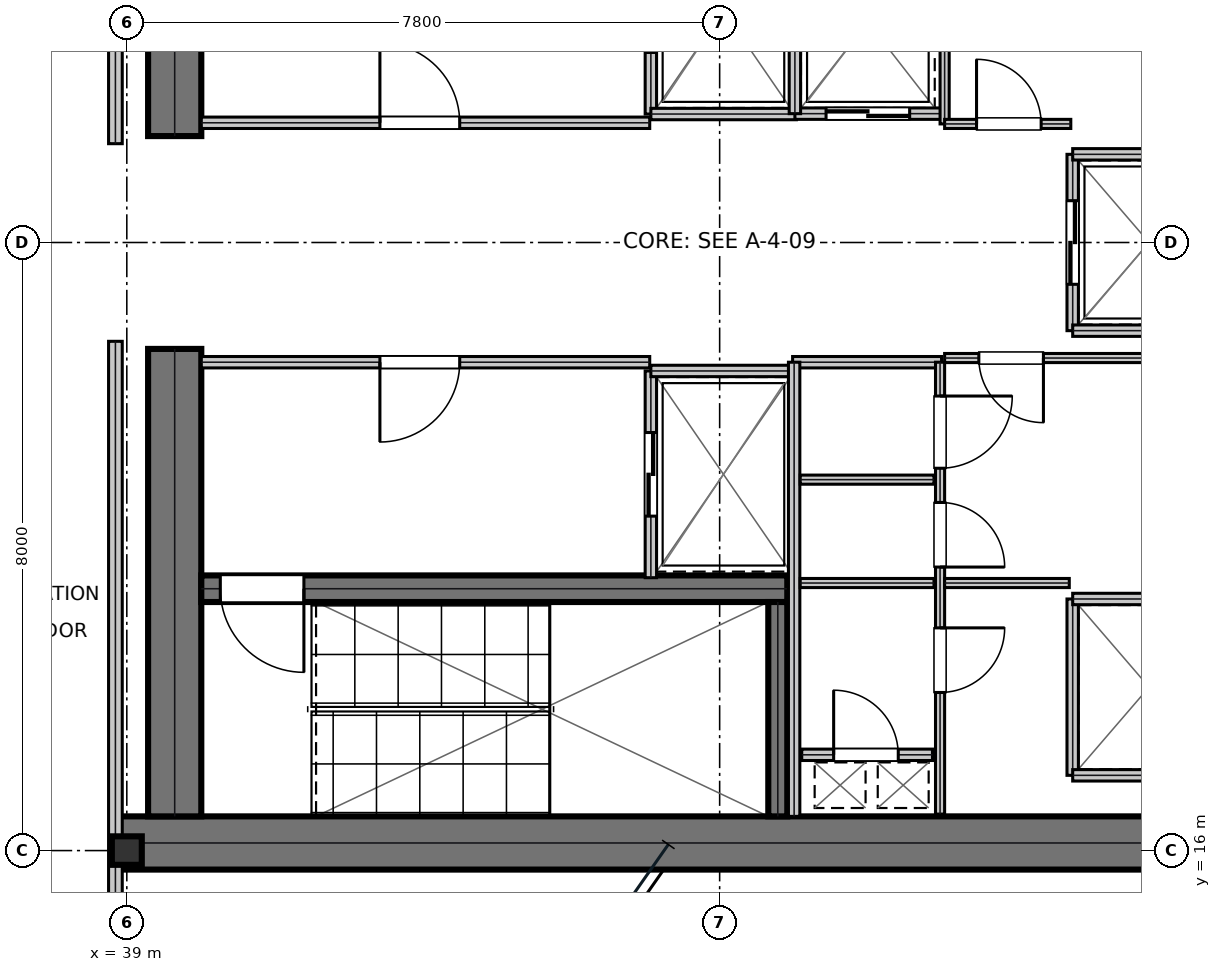
"""IFC4 building model, lengths in metres.
Left out: names, types, materials, properties, quantities, classifications, styles, units other than length and angle.
Written with IfcOpenShell. Run it as: python <this file> out.ifc"""

import sys

from ifc_helpers import new_model, si_unit, direction, frame, frame_2d, origin, origin_2d, place, context, subcontext, project, spatial, rectangle, i_section, extrude, element, fill, save


model = new_model("IFC4")
c1 = context("Model", 3, precision=1e-05, world=origin(), true_north=direction((0.0, 1.0)))
c2 = subcontext(c1, "Body", "Model", "MODEL_VIEW")
j1 = project(units=[si_unit("LENGTHUNIT", "METRE"), si_unit("PLANEANGLEUNIT", "RADIAN")], contexts=[c1])
p1 = place(None, origin())
s1 = spatial("IfcSite", under=j1, at=p1, CompositionType="ELEMENT")
p2 = place(p1, origin())
s2 = spatial("IfcBuilding", under=s1, at=p2, CompositionType="ELEMENT")
p3 = place(p2, frame((0.0, 0.0, 220.2)))
s3 = spatial("IfcBuildingStorey", under=s2, at=p3, CompositionType="ELEMENT", Elevation=220.2)
p4 = place(p3, frame((38.8, 16.1, 0.0), z_axis=(0.0, 0.0, 1.0), x_axis=(1.0, 0.0, 0.0)))
e1 = element("IfcWall", 1, at=p4, inside=s3, PredefinedType="SHEAR", context=c2, shape_type="SweptSolid", body=[
    extrude(rectangle(XDim=16.0, YDim=0.7, at=frame_2d((8.0, 0.0))), origin(), (0.0, 0.0, 1.0), 3.79),
])
for number, where, z_axis, x_axis in (
    (2, (39.63, 16.45, 0.0), (0.0, 0.0, 1.0), (0.0, 1.0, 0.0)),
    (3, (39.63, 25.4, 0.0), (0.0, 0.0, 1.0), (0.0, 1.0, 0.0)),
):
    element("IfcWall", number, at=place(p3, frame(where, z_axis=z_axis, x_axis=x_axis)), inside=s3, PredefinedType="SHEAR", context=c2, shape_type="SweptSolid", body=[
        extrude(rectangle(XDim=6.15, YDim=0.7, at=frame_2d((3.075, 0.0))), origin(), (0.0, 0.0, 1.0), 3.79),
    ])
p5 = place(p3, frame((39.98, 19.445, 0.0), z_axis=(0.0, 0.0, 1.0), x_axis=(1.0, 0.0, 0.0)))
e4 = element("IfcWall", 4, at=p5, inside=s3, PredefinedType="SHEAR", context=c2, shape_type="SweptSolid", body=[
    extrude(rectangle(XDim=7.71, YDim=0.35, at=frame_2d((3.855, 0.0))), origin(), (0.0, 0.0, 1.0), 3.79),
])
p6 = place(p5, frame((0.25, 0.0, 0.0)))
e5 = element("IfcOpeningElement", 5, at=p6, cuts=e4, PredefinedType="OPENING", context=c2, shape_type="SweptSolid", body=[
    extrude(rectangle(XDim=1.1, YDim=2.15, at=frame_2d((0.55, 1.075))), frame((0.0, 0.185, 0.0), z_axis=(0.0, -1.0, 0.0), x_axis=(1.0, 0.0, 0.0)), (0.0, 0.0, 1.0), 0.37),
])
p7 = place(p3, frame((47.565, 16.45, 0.0), z_axis=(0.0, 0.0, 1.0), x_axis=(0.0, 1.0, 0.0)))
e6 = element("IfcWall", 6, at=p7, inside=s3, PredefinedType="SHEAR", context=c2, shape_type="SweptSolid", body=[
    extrude(rectangle(XDim=2.82, YDim=0.25, at=frame_2d((1.41, 0.0))), origin(), (0.0, 0.0, 1.0), 3.79),
])
p8 = place(p3, frame((39.0, 16.0, 0.0), z_axis=(0.0, 0.0, 1.0), x_axis=(1.0, 0.0, 0.0)))
e7 = element("IfcColumn", 7, at=p8, inside=s3, PredefinedType="COLUMN", context=c2, shape_type="SweptSolid", body=[
    extrude(i_section(OverallWidth=0.394, OverallDepth=0.375, WebThickness=0.017, FlangeThickness=0.028, at=origin_2d()), origin(), (0.0, 0.0, 1.0), 4.044),
])
p9 = place(p3, frame((39.98, 25.575, 0.0), z_axis=(0.0, 0.0, 1.0), x_axis=(1.0, 0.0, 0.0)))
e8 = element("IfcWall", 8, at=p9, inside=s3, PredefinedType="PARTITIONING", context=c2, shape_type="SweptSolid", body=[
    extrude(rectangle(XDim=5.9, YDim=0.15, at=frame_2d((2.95, 0.0))), origin(), (0.0, 0.0, 1.0), 3.79),
])
p10 = place(p9, frame((2.35, 0.0, 0.0)))
e9 = element("IfcOpeningElement", 9, at=p10, cuts=e8, PredefinedType="OPENING", context=c2, shape_type="SweptSolid", body=[
    extrude(rectangle(XDim=1.05, YDim=2.15, at=frame_2d((0.525, 1.075))), frame((0.0, 0.085, 0.0), z_axis=(0.0, -1.0, 0.0), x_axis=(1.0, 0.0, 0.0)), (0.0, 0.0, 1.0), 0.17),
])
p11 = place(p3, frame((39.98, 22.425, 0.0), z_axis=(0.0, 0.0, 1.0), x_axis=(1.0, 0.0, 0.0)))
e10 = element("IfcWall", 10, at=p11, inside=s3, PredefinedType="PARTITIONING", context=c2, shape_type="SweptSolid", body=[
    extrude(rectangle(XDim=5.9, YDim=0.15, at=frame_2d((2.95, 0.0))), origin(), (0.0, 0.0, 1.0), 3.79),
])
p12 = place(p11, frame((2.35, 0.0, 0.0)))
e11 = element("IfcOpeningElement", 11, at=p12, cuts=e10, PredefinedType="OPENING", context=c2, shape_type="SweptSolid", body=[
    extrude(rectangle(XDim=1.05, YDim=2.15, at=frame_2d((0.525, 1.075))), frame((0.0, 0.085, 0.0), z_axis=(0.0, -1.0, 0.0), x_axis=(1.0, 0.0, 0.0)), (0.0, 0.0, 1.0), 0.17),
])
p13 = place(p3, frame((45.895, 25.69, 0.0), z_axis=(0.0, 0.0, 1.0), x_axis=(0.0, 1.0, 0.0)))
e12 = element("IfcWall", 12, at=p13, inside=s3, PredefinedType="PARTITIONING", context=c2, shape_type="SweptSolid", body=[
    extrude(rectangle(XDim=2.72, YDim=0.15, at=frame_2d((1.36, 0.0))), origin(), (0.0, 0.0, 1.0), 3.79),
])
p14 = place(p13, frame((0.81, 0.0, 0.0)))
e13 = element("IfcOpeningElement", 13, at=p14, cuts=e12, PredefinedType="OPENING", context=c2, shape_type="SweptSolid", body=[
    extrude(rectangle(XDim=1.1, YDim=2.15, at=frame_2d((0.55, 1.075))), frame((0.0, 0.085, 0.0), z_axis=(0.0, -1.0, 0.0), x_axis=(1.0, 0.0, 0.0)), (0.0, 0.0, 1.0), 0.17),
])
p15 = place(p3, frame((45.895, 25.69, 0.0), z_axis=(0.0, 0.0, 1.0), x_axis=(1.0, 0.0, 0.0)))
e14 = element("IfcWall", 14, at=p15, inside=s3, PredefinedType="PARTITIONING", context=c2, shape_type="SweptSolid", body=[
    extrude(rectangle(XDim=1.915, YDim=0.15, at=frame_2d((0.958, 0.0))), origin(), (0.0, 0.0, 1.0), 3.79),
])
p16 = place(p3, frame((45.895, 19.59, 0.0), z_axis=(0.0, 0.0, 1.0), x_axis=(0.0, 1.0, 0.0)))
e15 = element("IfcWall", 15, at=p16, inside=s3, PredefinedType="PARTITIONING", context=c2, shape_type="SweptSolid", body=[
    extrude(rectangle(XDim=2.72, YDim=0.15, at=frame_2d((1.36, 0.0))), origin(), (0.0, 0.0, 1.0), 3.79),
])
p17 = place(p16, frame((0.81, 0.0, 0.0)))
e16 = element("IfcOpeningElement", 16, at=p17, cuts=e15, PredefinedType="OPENING", context=c2, shape_type="SweptSolid", body=[
    extrude(rectangle(XDim=1.1, YDim=2.15, at=frame_2d((0.55, 1.075))), frame((0.0, 0.085, 0.0), z_axis=(0.0, -1.0, 0.0), x_axis=(1.0, 0.0, 0.0)), (0.0, 0.0, 1.0), 0.17),
])
p18 = place(p3, frame((45.895, 22.31, 0.0), z_axis=(0.0, 0.0, 1.0), x_axis=(1.0, 0.0, 0.0)))
e17 = element("IfcWall", 17, at=p18, inside=s3, PredefinedType="PARTITIONING", context=c2, shape_type="SweptSolid", body=[
    extrude(rectangle(XDim=1.915, YDim=0.15, at=frame_2d((0.958, 0.0))), origin(), (0.0, 0.0, 1.0), 3.79),
])
p19 = place(p3, frame((47.79, 25.695, 0.0), z_axis=(0.0, 0.0, 1.0), x_axis=(1.0, 0.0, 0.0)))
e18 = element("IfcWall", 18, at=p19, inside=s3, PredefinedType="PARTITIONING", context=c2, shape_type="SweptSolid", body=[
    extrude(rectangle(XDim=1.92, YDim=0.15, at=frame_2d((0.96, 0.0))), origin(), (0.0, 0.0, 1.0), 3.79),
])
p20 = place(p19, frame((0.41, 0.0, 0.0)))
e19 = element("IfcOpeningElement", 19, at=p20, cuts=e18, PredefinedType="OPENING", context=c2, shape_type="SweptSolid", body=[
    extrude(rectangle(XDim=1.1, YDim=2.15, at=frame_2d((0.55, 1.075))), frame((0.0, 0.085, 0.0), z_axis=(0.0, -1.0, 0.0), x_axis=(1.0, 0.0, 0.0)), (0.0, 0.0, 1.0), 0.17),
])
p21 = place(p3, frame((47.79, 25.695, 0.0), z_axis=(0.0, 0.0, 1.0), x_axis=(0.0, 1.0, 0.0)))
e20 = element("IfcWall", 20, at=p21, inside=s3, PredefinedType="PARTITIONING", context=c2, shape_type="SweptSolid", body=[
    extrude(rectangle(XDim=2.415, YDim=0.15, at=frame_2d((1.208, 0.0))), origin(), (0.0, 0.0, 1.0), 3.79),
])
p22 = place(p3, frame((51.445, 22.84, 0.0), z_axis=(0.0, 0.0, 1.0), x_axis=(0.0, 1.0, 0.0)))
e21 = element("IfcWall", 21, at=p22, inside=s3, PredefinedType="PARTITIONING", context=c2, shape_type="SweptSolid", body=[
    extrude(rectangle(XDim=2.32, YDim=0.15, at=frame_2d((1.16, 0.0))), origin(), (0.0, 0.0, 1.0), 3.79),
])
p23 = place(p22, frame((0.61, 0.0, 0.0)))
e22 = element("IfcOpeningElement", 22, at=p23, cuts=e21, PredefinedType="OPENING", context=c2, shape_type="SweptSolid", body=[
    extrude(rectangle(XDim=1.1, YDim=2.15, at=frame_2d((0.55, 1.075))), frame((0.0, 0.085, 0.0), z_axis=(0.0, -1.0, 0.0), x_axis=(1.0, 0.0, 0.0)), (0.0, 0.0, 1.0), 0.17),
])
for number, where, z_axis, x_axis in (
    (23, (51.445, 22.84, 0.0), (0.0, 0.0, 1.0), (1.0, 0.0, 0.0)),
    (24, (51.445, 25.16, 0.0), (0.0, 0.0, 1.0), (1.0, 0.0, 0.0)),
):
    element("IfcWall", number, at=place(p3, frame(where, z_axis=z_axis, x_axis=x_axis)), inside=s3, PredefinedType="PARTITIONING", context=c2, shape_type="SweptSolid", body=[
        extrude(rectangle(XDim=2.015, YDim=0.15, at=frame_2d((1.007, 0.0))), origin(), (0.0, 0.0, 1.0), 3.79),
    ])
p24 = place(p3, frame((51.445, 16.99, 0.0), z_axis=(0.0, 0.0, 1.0), x_axis=(0.0, 1.0, 0.0)))
e25 = element("IfcWall", 25, at=p24, inside=s3, PredefinedType="PARTITIONING", context=c2, shape_type="SweptSolid", body=[
    extrude(rectangle(XDim=2.32, YDim=0.15, at=frame_2d((1.16, 0.0))), origin(), (0.0, 0.0, 1.0), 3.79),
])
for number, where, z_axis, x_axis in (
    (26, (51.445, 16.99, 0.0), (0.0, 0.0, 1.0), (1.0, 0.0, 0.0)),
    (27, (51.445, 19.31, 0.0), (0.0, 0.0, 1.0), (1.0, 0.0, 0.0)),
):
    element("IfcWall", number, at=place(p3, frame(where, z_axis=z_axis, x_axis=x_axis)), inside=s3, PredefinedType="PARTITIONING", context=c2, shape_type="SweptSolid", body=[
        extrude(rectangle(XDim=2.015, YDim=0.15, at=frame_2d((1.007, 0.0))), origin(), (0.0, 0.0, 1.0), 3.79),
    ])
p25 = place(p3, frame((47.88, 17.26, 0.0), z_axis=(0.0, 0.0, 1.0), x_axis=(1.0, 0.0, 0.0)))
e28 = element("IfcWall", 28, at=p25, inside=s3, PredefinedType="PARTITIONING", context=c2, shape_type="SweptSolid", body=[
    extrude(rectangle(XDim=1.72, YDim=0.15, at=frame_2d((0.86, 0.0))), origin(), (0.0, 0.0, 1.0), 3.79),
])
p26 = place(p25, frame((0.42, 0.0, 0.0)))
e29 = element("IfcOpeningElement", 29, at=p26, cuts=e28, PredefinedType="OPENING", context=c2, shape_type="SweptSolid", body=[
    extrude(rectangle(XDim=0.85, YDim=2.15, at=frame_2d((0.425, 1.075))), frame((0.0, 0.085, 0.0), z_axis=(0.0, -1.0, 0.0), x_axis=(1.0, 0.0, 0.0)), (0.0, 0.0, 1.0), 0.17),
])
p27 = place(p3, frame((47.76, 22.425, 0.0), z_axis=(0.0, 0.0, 1.0), x_axis=(1.0, 0.0, 0.0)))
e30 = element("IfcWall", 30, at=p27, inside=s3, PredefinedType="PARTITIONING", context=c2, shape_type="SweptSolid", body=[
    extrude(rectangle(XDim=1.96, YDim=0.15, at=frame_2d((0.98, 0.0))), origin(), (0.0, 0.0, 1.0), 3.79),
])
p28 = place(p3, frame((47.78, 16.45, 0.0), z_axis=(0.0, 0.0, 1.0), x_axis=(0.0, 1.0, 0.0)))
e31 = element("IfcWall", 31, at=p28, inside=s3, PredefinedType="PARTITIONING", context=c2, shape_type="SweptSolid", body=[
    extrude(rectangle(XDim=5.975, YDim=0.15, at=frame_2d((2.988, 0.0))), origin(), (0.0, 0.0, 1.0), 3.79),
])
for number, where, z_axis, x_axis in (
    (32, (47.86, 19.52, 0.0), (0.0, 0.0, 1.0), (1.0, 0.0, 0.0)),
    (33, (47.86, 20.88, 0.0), (0.0, 0.0, 1.0), (1.0, 0.0, 0.0)),
):
    element("IfcWall", number, at=place(p3, frame(where, z_axis=z_axis, x_axis=x_axis)), inside=s3, PredefinedType="PARTITIONING", context=c2, shape_type="SweptSolid", body=[
        extrude(rectangle(XDim=1.76, YDim=0.12, at=frame_2d((0.88, 0.0))), origin(), (0.0, 0.0, 1.0), 3.79),
    ])
p29 = place(p3, frame((49.7, 16.48, 0.0), z_axis=(0.0, 0.0, 1.0), x_axis=(0.0, 1.0, 0.0)))
e34 = element("IfcWall", 34, at=p29, inside=s3, PredefinedType="PARTITIONING", context=c2, shape_type="SweptSolid", body=[
    extrude(rectangle(XDim=5.945, YDim=0.12, at=frame_2d((2.973, 0.0))), origin(), (0.0, 0.0, 1.0), 3.79),
])
p30 = place(p29, frame((1.6, 0.0, 0.0)))
e35 = element("IfcOpeningElement", 35, at=p30, cuts=e34, PredefinedType="OPENING", context=c2, shape_type="SweptSolid", body=[
    extrude(rectangle(XDim=0.85, YDim=2.15, at=frame_2d((0.425, 1.075))), frame((0.0, 0.07, 0.0), z_axis=(0.0, -1.0, 0.0), x_axis=(1.0, 0.0, 0.0)), (0.0, 0.0, 1.0), 0.14),
])
p31 = place(p29, frame((3.25, 0.0, 0.0)))
e36 = element("IfcOpeningElement", 36, at=p31, cuts=e34, PredefinedType="OPENING", context=c2, shape_type="SweptSolid", body=[
    extrude(rectangle(XDim=0.85, YDim=2.15, at=frame_2d((0.425, 1.075))), frame((0.0, 0.07, 0.0), z_axis=(0.0, -1.0, 0.0), x_axis=(1.0, 0.0, 0.0)), (0.0, 0.0, 1.0), 0.14),
])
p32 = place(p29, frame((4.55, 0.0, 0.0)))
e37 = element("IfcOpeningElement", 37, at=p32, cuts=e34, PredefinedType="OPENING", context=c2, shape_type="SweptSolid", body=[
    extrude(rectangle(XDim=0.95, YDim=2.15, at=frame_2d((0.475, 1.075))), frame((0.0, 0.07, 0.0), z_axis=(0.0, -1.0, 0.0), x_axis=(1.0, 0.0, 0.0)), (0.0, 0.0, 1.0), 0.14),
])
p33 = place(p3, frame((49.76, 22.48, 0.0), z_axis=(0.0, 0.0, 1.0), x_axis=(1.0, 0.0, 0.0)))
e38 = element("IfcWall", 38, at=p33, inside=s3, PredefinedType="PARTITIONING", context=c2, shape_type="SweptSolid", body=[
    extrude(rectangle(XDim=3.9, YDim=0.12, at=frame_2d((1.95, 0.0))), origin(), (0.0, 0.0, 1.0), 3.79),
])
p34 = place(p33, frame((0.45, 0.0, 0.0)))
e39 = element("IfcOpeningElement", 39, at=p34, cuts=e38, PredefinedType="OPENING", context=c2, shape_type="SweptSolid", body=[
    extrude(rectangle(XDim=0.85, YDim=2.15, at=frame_2d((0.425, 1.075))), frame((0.0, 0.07, 0.0), z_axis=(0.0, -1.0, 0.0), x_axis=(1.0, 0.0, 0.0)), (0.0, 0.0, 1.0), 0.14),
])
p35 = place(p3, frame((49.76, 19.52, 0.0), z_axis=(0.0, 0.0, 1.0), x_axis=(1.0, 0.0, 0.0)))
e40 = element("IfcWall", 40, at=p35, inside=s3, PredefinedType="PARTITIONING", context=c2, shape_type="SweptSolid", body=[
    extrude(rectangle(XDim=1.64, YDim=0.12, at=frame_2d((0.82, 0.0))), origin(), (0.0, 0.0, 1.0), 3.79),
])
p36 = place(p3, frame((49.76, 25.56, 0.0), z_axis=(0.0, 0.0, 1.0), x_axis=(0.0, 1.0, 0.0)))
e41 = element("IfcWall", 41, at=p36, inside=s3, PredefinedType="PARTITIONING", context=c2, shape_type="SweptSolid", body=[
    extrude(rectangle(XDim=2.66, YDim=0.12, at=frame_2d((1.33, 0.0))), origin(), (0.0, 0.0, 1.0), 3.79),
])
p37 = place(p3, frame((49.76, 25.56, 0.0), z_axis=(0.0, 0.0, 1.0), x_axis=(1.0, 0.0, 0.0)))
e42 = element("IfcWall", 42, at=p37, inside=s3, PredefinedType="PARTITIONING", context=c2, shape_type="SweptSolid", body=[
    extrude(rectangle(XDim=1.66, YDim=0.12, at=frame_2d((0.83, 0.0))), origin(), (0.0, 0.0, 1.0), 3.79),
])
p38 = place(p37, frame((0.42, 0.0, 0.0)))
e43 = element("IfcOpeningElement", 43, at=p38, cuts=e42, PredefinedType="OPENING", context=c2, shape_type="SweptSolid", body=[
    extrude(rectangle(XDim=0.85, YDim=2.15, at=frame_2d((0.425, 1.075))), frame((0.0, 0.07, 0.0), z_axis=(0.0, -1.0, 0.0), x_axis=(1.0, 0.0, 0.0)), (0.0, 0.0, 1.0), 0.14),
])
p39 = place(p3, frame((38.85, 14.707, 0.0), z_axis=(0.0, 0.0, 1.0), x_axis=(0.0, 1.0, 0.0)))
e44 = element("IfcWall", 44, at=p39, inside=s3, PredefinedType="SOLIDWALL", context=c2, shape_type="SweptSolid", body=[
    extrude(rectangle(XDim=7.993, YDim=0.18, at=frame_2d((3.997, 0.0))), origin(), (0.0, 0.0, 1.0), 3.241),
])
p40 = place(p3, frame((38.85, 25.3, 0.0), z_axis=(0.0, 0.0, 1.0), x_axis=(0.0, 1.0, 0.0)))
e45 = element("IfcWall", 45, at=p40, inside=s3, PredefinedType="SOLIDWALL", context=c2, shape_type="SweptSolid", body=[
    extrude(rectangle(XDim=8.2, YDim=0.18, at=frame_2d((4.1, 0.0))), origin(), (0.0, 0.0, 1.0), 3.241),
])
p41 = place(p10, origin())
e46 = element("IfcDoor", 46, at=p41, inside=s3, OperationType="SINGLE_SWING_LEFT", PredefinedType="DOOR", context=c2, shape_type="SweptSolid", body=[
    extrude(rectangle(XDim=1.05, YDim=2.15, at=frame_2d((0.525, 1.075))), frame((0.0, 0.025, 0.0), z_axis=(0.0, -1.0, 0.0), x_axis=(1.0, 0.0, 0.0)), (0.0, 0.0, 1.0), 0.05),
])
fill(e9, e46)
p42 = place(p12, frame((1.05, 0.0, 0.0), z_axis=(0.0, 0.0, 1.0), x_axis=(-1.0, 0.0, 0.0)))
e47 = element("IfcDoor", 47, at=p42, inside=s3, OperationType="SINGLE_SWING_RIGHT", PredefinedType="DOOR", context=c2, shape_type="SweptSolid", body=[
    extrude(rectangle(XDim=1.05, YDim=2.15, at=frame_2d((0.525, 1.075))), frame((0.0, 0.025, 0.0), z_axis=(0.0, -1.0, 0.0), x_axis=(1.0, 0.0, 0.0)), (0.0, 0.0, 1.0), 0.05),
])
fill(e11, e47)
p43 = place(p17, frame((1.1, 0.0, 0.0), z_axis=(0.0, 0.0, 1.0), x_axis=(-1.0, 0.0, 0.0)))
e48 = element("IfcDoor", 48, at=p43, inside=s3, OperationType="DOUBLE_DOOR_SLIDING", PredefinedType="DOOR", context=c2, shape_type="SweptSolid", body=[
    extrude(rectangle(XDim=1.1, YDim=2.15, at=frame_2d((0.55, 1.075))), frame((0.0, 0.025, 0.0), z_axis=(0.0, -1.0, 0.0), x_axis=(1.0, 0.0, 0.0)), (0.0, 0.0, 1.0), 0.05),
])
fill(e16, e48)
p44 = place(p20, frame((1.1, 0.0, 0.0), z_axis=(0.0, 0.0, 1.0), x_axis=(-1.0, 0.0, 0.0)))
e49 = element("IfcDoor", 49, at=p44, inside=s3, OperationType="DOUBLE_DOOR_SLIDING", PredefinedType="DOOR", context=c2, shape_type="SweptSolid", body=[
    extrude(rectangle(XDim=1.1, YDim=2.15, at=frame_2d((0.55, 1.075))), frame((0.0, 0.025, 0.0), z_axis=(0.0, -1.0, 0.0), x_axis=(1.0, 0.0, 0.0)), (0.0, 0.0, 1.0), 0.05),
])
fill(e19, e49)
p45 = place(p23, frame((1.1, 0.0, 0.0), z_axis=(0.0, 0.0, 1.0), x_axis=(-1.0, 0.0, 0.0)))
e50 = element("IfcDoor", 50, at=p45, inside=s3, OperationType="DOUBLE_DOOR_SLIDING", PredefinedType="DOOR", context=c2, shape_type="SweptSolid", body=[
    extrude(rectangle(XDim=1.1, YDim=2.15, at=frame_2d((0.55, 1.075))), frame((0.0, 0.025, 0.0), z_axis=(0.0, -1.0, 0.0), x_axis=(1.0, 0.0, 0.0)), (0.0, 0.0, 1.0), 0.05),
])
fill(e22, e50)
p46 = place(p26, origin())
e51 = element("IfcDoor", 51, at=p46, inside=s3, OperationType="SINGLE_SWING_LEFT", PredefinedType="TRAPDOOR", context=c2, shape_type="SweptSolid", body=[
    extrude(rectangle(XDim=0.85, YDim=2.15, at=frame_2d((0.425, 1.075))), frame((0.0, 0.025, 0.0), z_axis=(0.0, -1.0, 0.0), x_axis=(1.0, 0.0, 0.0)), (0.0, 0.0, 1.0), 0.05),
])
fill(e29, e51)
p47 = place(p30, frame((0.85, 0.0, 0.0), z_axis=(0.0, 0.0, 1.0), x_axis=(-1.0, 0.0, 0.0)))
e52 = element("IfcDoor", 52, at=p47, inside=s3, OperationType="SINGLE_SWING_LEFT", PredefinedType="DOOR", context=c2, shape_type="SweptSolid", body=[
    extrude(rectangle(XDim=0.85, YDim=2.15, at=frame_2d((0.425, 1.075))), frame((0.0, 0.025, 0.0), z_axis=(0.0, -1.0, 0.0), x_axis=(1.0, 0.0, 0.0)), (0.0, 0.0, 1.0), 0.05),
])
fill(e35, e52)
p48 = place(p31, frame((0.85, 0.0, 0.0), z_axis=(0.0, 0.0, 1.0), x_axis=(-1.0, 0.0, 0.0)))
e53 = element("IfcDoor", 53, at=p48, inside=s3, OperationType="SINGLE_SWING_RIGHT", PredefinedType="DOOR", context=c2, shape_type="SweptSolid", body=[
    extrude(rectangle(XDim=0.85, YDim=2.15, at=frame_2d((0.425, 1.075))), frame((0.0, 0.025, 0.0), z_axis=(0.0, -1.0, 0.0), x_axis=(1.0, 0.0, 0.0)), (0.0, 0.0, 1.0), 0.05),
])
fill(e36, e53)
p49 = place(p32, frame((0.95, 0.0, 0.0), z_axis=(0.0, 0.0, 1.0), x_axis=(-1.0, 0.0, 0.0)))
e54 = element("IfcDoor", 54, at=p49, inside=s3, OperationType="SINGLE_SWING_LEFT", PredefinedType="DOOR", context=c2, shape_type="SweptSolid", body=[
    extrude(rectangle(XDim=0.95, YDim=2.15, at=frame_2d((0.475, 1.075))), frame((0.0, 0.025, 0.0), z_axis=(0.0, -1.0, 0.0), x_axis=(1.0, 0.0, 0.0)), (0.0, 0.0, 1.0), 0.05),
])
fill(e37, e54)
p50 = place(p34, frame((0.85, 0.0, 0.0), z_axis=(0.0, 0.0, 1.0), x_axis=(-1.0, 0.0, 0.0)))
e55 = element("IfcDoor", 55, at=p50, inside=s3, OperationType="SINGLE_SWING_LEFT", PredefinedType="DOOR", context=c2, shape_type="SweptSolid", body=[
    extrude(rectangle(XDim=0.85, YDim=2.15, at=frame_2d((0.425, 1.075))), frame((0.0, 0.025, 0.0), z_axis=(0.0, -1.0, 0.0), x_axis=(1.0, 0.0, 0.0)), (0.0, 0.0, 1.0), 0.05),
])
fill(e39, e55)
p51 = place(p38, origin())
e56 = element("IfcDoor", 56, at=p51, inside=s3, OperationType="SINGLE_SWING_LEFT", PredefinedType="DOOR", context=c2, shape_type="SweptSolid", body=[
    extrude(rectangle(XDim=0.85, YDim=2.15, at=frame_2d((0.425, 1.075))), frame((0.0, 0.025, 0.0), z_axis=(0.0, -1.0, 0.0), x_axis=(1.0, 0.0, 0.0)), (0.0, 0.0, 1.0), 0.05),
])
fill(e43, e56)
p52 = place(p6, frame((1.1, 0.0, 0.0), z_axis=(0.0, 0.0, 1.0), x_axis=(-1.0, 0.0, 0.0)))
e57 = element("IfcDoor", 57, at=p52, inside=s3, OperationType="SINGLE_SWING_LEFT", PredefinedType="DOOR", context=c2, shape_type="SweptSolid", body=[
    extrude(rectangle(XDim=1.1, YDim=2.15, at=frame_2d((0.55, 1.075))), frame((0.0, 0.025, 0.0), z_axis=(0.0, -1.0, 0.0), x_axis=(1.0, 0.0, 0.0)), (0.0, 0.0, 1.0), 0.05),
])
fill(e5, e57)
save(model, sys.argv[1])
